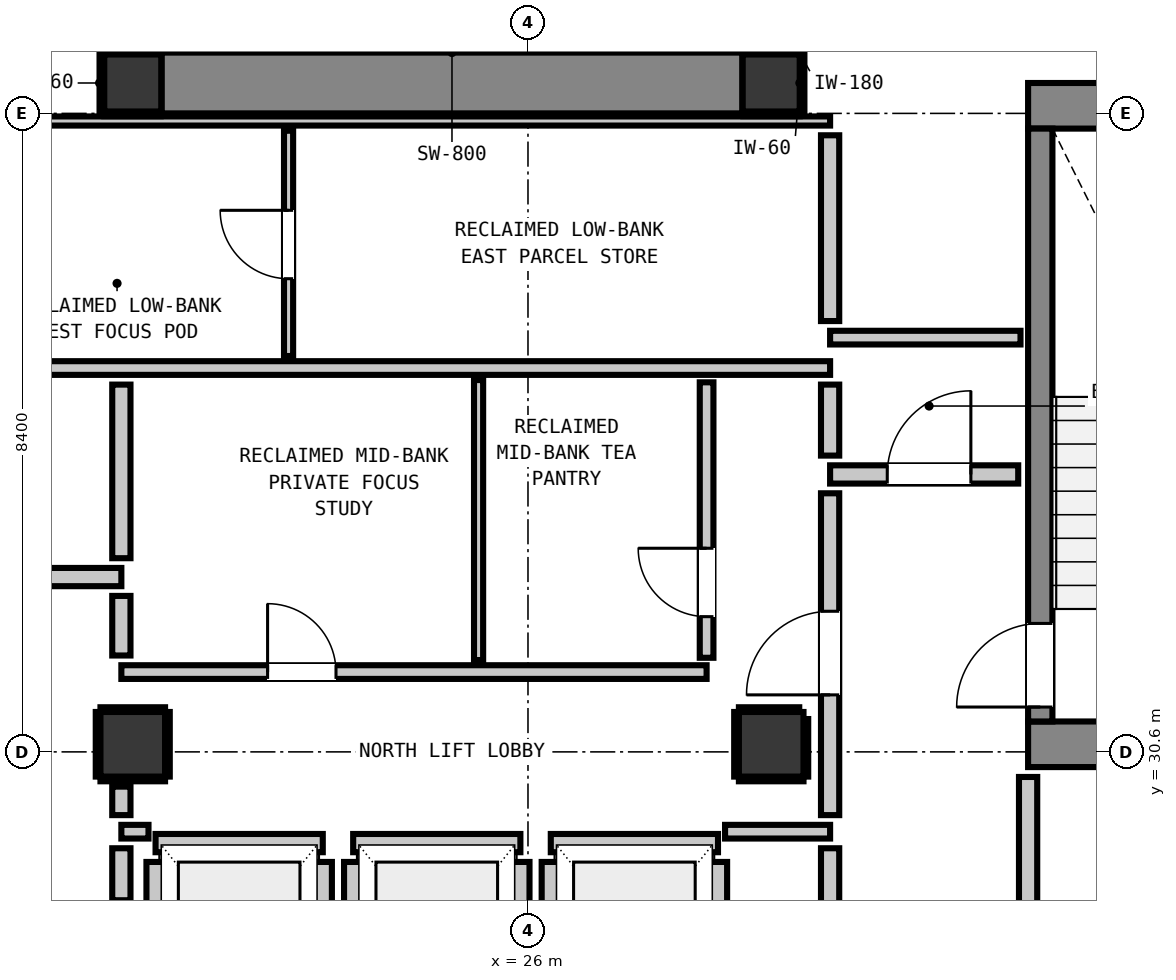
"""IFC4 building model, lengths in metres.
Left out: names, types, materials, properties, quantities, classifications, styles, units other than length and angle.
Written with IfcOpenShell. Run it as: python <this file> out.ifc"""

import sys

from ifc_helpers import new_model, si_unit, direction, frame, frame_2d, origin, origin_2d, place, context, subcontext, project, spatial, rectangle, extrude, element, fill, save


model = new_model("IFC4")
c1 = context("Model", 3, precision=1e-05, world=origin(), true_north=direction((0.0, 1.0)))
c2 = subcontext(c1, "Body", "Model", "MODEL_VIEW")
j1 = project(units=[si_unit("LENGTHUNIT", "METRE"), si_unit("PLANEANGLEUNIT", "RADIAN")], contexts=[c1])
p1 = place(None, origin())
s1 = spatial("IfcSite", under=j1, at=p1, CompositionType="ELEMENT")
p2 = place(p1, origin())
s2 = spatial("IfcBuilding", under=s1, at=p2, CompositionType="ELEMENT")
p3 = place(p2, frame((0.0, 0.0, 183.52)))
s3 = spatial("IfcBuildingStorey", under=s2, at=p3, CompositionType="ELEMENT", Elevation=183.52)
for number, where, z_axis, x_axis in (
    (1, (20.8, 39.4, 0.0), (0.0, 0.0, 1.0), (1.0, 0.0, 0.0)),
    (2, (29.2, 39.4, 0.0), (0.0, 0.0, 1.0), (1.0, 0.0, 0.0)),
):
    element("IfcColumn", number, at=place(p3, frame(where, z_axis=z_axis, x_axis=x_axis)), inside=s3, PredefinedType="COLUMN", context=c2, shape_type="SweptSolid", body=[
        extrude(rectangle(XDim=0.75, YDim=0.75, at=origin_2d()), origin(), (0.0, 0.0, 1.0), 3.32),
    ])
p4 = place(p3, frame((32.58, 39.1, 0.0), z_axis=(0.0, 0.0, 1.0), x_axis=(1.0, 0.0, 0.0)))
e3 = element("IfcWall", 3, at=p4, inside=s3, PredefinedType="SHEAR", context=c2, shape_type="SweptSolid", body=[
    extrude(rectangle(XDim=4.08, YDim=0.6, at=frame_2d((2.04, 0.0))), origin(), (0.0, 0.0, 1.0), 3.32),
])
p5 = place(p3, frame((32.58, 30.7, 0.0), z_axis=(0.0, 0.0, 1.0), x_axis=(1.0, 0.0, 0.0)))
e4 = element("IfcWall", 4, at=p5, inside=s3, PredefinedType="SHEAR", context=c2, shape_type="SweptSolid", body=[
    extrude(rectangle(XDim=3.54, YDim=0.6, at=frame_2d((1.77, 0.0))), origin(), (0.0, 0.0, 1.0), 3.32),
])
p6 = place(p3, frame((21.18, 39.4, 0.0), z_axis=(0.0, 0.0, 1.0), x_axis=(1.0, 0.0, 0.0)))
e5 = element("IfcWall", 5, at=p6, inside=s3, PredefinedType="SHEAR", context=c2, shape_type="SweptSolid", body=[
    extrude(rectangle(XDim=7.64, YDim=0.8, at=frame_2d((3.82, 0.0))), origin(), (0.0, 0.0, 1.0), 3.32),
])
p7 = place(p3, frame((32.74, 31.0, 0.0), z_axis=(0.0, 0.0, 1.0), x_axis=(0.0, 1.0, 0.0)))
e6 = element("IfcWall", 6, at=p7, inside=s3, PredefinedType="SHEAR", context=c2, shape_type="SweptSolid", body=[
    extrude(rectangle(XDim=7.8, YDim=0.32, at=frame_2d((3.9, 0.0))), origin(), (0.0, 0.0, 1.0), 3.32),
])
p8 = place(p7, frame((0.19, 0.0, 0.0)))
e7 = element("IfcOpeningElement", 7, at=p8, cuts=e6, PredefinedType="OPENING", context=c2, shape_type="SweptSolid", body=[
    extrude(rectangle(XDim=1.1, YDim=2.15, at=frame_2d((0.55, 1.075))), frame((0.0, 0.17, 0.0), z_axis=(0.0, -1.0, 0.0), x_axis=(1.0, 0.0, 0.0)), (0.0, 0.0, 1.0), 0.34),
])
for number, where, z_axis, x_axis in (
    (8, (20.8, 30.7, 0.0), (0.0, 0.0, 1.0), (1.0, 0.0, 0.0)),
    (9, (29.2, 30.7, 0.0), (0.0, 0.0, 1.0), (1.0, 0.0, 0.0)),
):
    element("IfcColumn", number, at=place(p3, frame(where, z_axis=z_axis, x_axis=x_axis)), inside=s3, PredefinedType="COLUMN", context=c2, shape_type="SweptSolid", body=[
        extrude(rectangle(XDim=0.85, YDim=0.85, at=origin_2d()), origin(), (0.0, 0.0, 1.0), 3.32),
    ])
p9 = place(p3, frame((21.1, 29.4, 0.0), z_axis=(0.0, 0.0, 1.0), x_axis=(1.0, 0.0, 0.0)))
e10 = element("IfcWall", 10, at=p9, inside=s3, PredefinedType="PARTITIONING", context=c2, shape_type="SweptSolid", body=[
    extrude(rectangle(XDim=2.2, YDim=0.24, at=frame_2d((1.1, 0.0))), origin(), (0.0, 0.0, 1.0), 3.08),
])
p10 = place(p3, frame((21.1, 27.048, 0.0), z_axis=(0.0, 0.0, 1.0), x_axis=(0.0, 1.0, 0.0)))
e11 = element("IfcWall", 11, at=p10, inside=s3, PredefinedType="PARTITIONING", context=c2, shape_type="SweptSolid", body=[
    extrude(rectangle(XDim=2.104, YDim=0.24, at=frame_2d((1.052, 0.0))), origin(), (0.0, 0.0, 1.0), 2.315),
])
p11 = place(p3, frame((23.3, 27.048, 0.0), z_axis=(0.0, 0.0, 1.0), x_axis=(0.0, 1.0, 0.0)))
e12 = element("IfcWall", 12, at=p11, inside=s3, PredefinedType="PARTITIONING", context=c2, shape_type="SweptSolid", body=[
    extrude(rectangle(XDim=2.104, YDim=0.24, at=frame_2d((1.052, 0.0))), origin(), (0.0, 0.0, 1.0), 3.08),
])
p12 = place(p3, frame((23.7, 29.4, 0.0), z_axis=(0.0, 0.0, 1.0), x_axis=(1.0, 0.0, 0.0)))
e13 = element("IfcWall", 13, at=p12, inside=s3, PredefinedType="PARTITIONING", context=c2, shape_type="SweptSolid", body=[
    extrude(rectangle(XDim=2.2, YDim=0.24, at=frame_2d((1.1, 0.0))), origin(), (0.0, 0.0, 1.0), 3.08),
])
for number, where, z_axis, x_axis in (
    (14, (23.7, 27.048, 0.0), (0.0, 0.0, 1.0), (0.0, 1.0, 0.0)),
    (15, (25.9, 27.048, 0.0), (0.0, 0.0, 1.0), (0.0, 1.0, 0.0)),
):
    element("IfcWall", number, at=place(p3, frame(where, z_axis=z_axis, x_axis=x_axis)), inside=s3, PredefinedType="PARTITIONING", context=c2, shape_type="SweptSolid", body=[
        extrude(rectangle(XDim=2.104, YDim=0.24, at=frame_2d((1.052, 0.0))), origin(), (0.0, 0.0, 1.0), 3.08),
    ])
p13 = place(p3, frame((26.3, 29.4, 0.0), z_axis=(0.0, 0.0, 1.0), x_axis=(1.0, 0.0, 0.0)))
e16 = element("IfcWall", 16, at=p13, inside=s3, PredefinedType="PARTITIONING", context=c2, shape_type="SweptSolid", body=[
    extrude(rectangle(XDim=2.2, YDim=0.24, at=frame_2d((1.1, 0.0))), origin(), (0.0, 0.0, 1.0), 3.08),
])
p14 = place(p3, frame((26.3, 27.048, 0.0), z_axis=(0.0, 0.0, 1.0), x_axis=(0.0, 1.0, 0.0)))
e17 = element("IfcWall", 17, at=p14, inside=s3, PredefinedType="PARTITIONING", context=c2, shape_type="SweptSolid", body=[
    extrude(rectangle(XDim=2.104, YDim=0.24, at=frame_2d((1.052, 0.0))), origin(), (0.0, 0.0, 1.0), 3.08),
])
p15 = place(p3, frame((28.5, 27.33, 0.0), z_axis=(0.0, 0.0, 1.0), x_axis=(0.0, 1.0, 0.0)))
e18 = element("IfcWall", 18, at=p15, inside=s3, PredefinedType="PARTITIONING", context=c2, shape_type="SweptSolid", body=[
    extrude(rectangle(XDim=1.822, YDim=0.24, at=frame_2d((0.911, 0.0))), origin(), (0.0, 0.0, 1.0), 3.08),
])
p16 = place(p3, frame((17.45, 32.9, 0.0), z_axis=(0.0, 0.0, 1.0), x_axis=(1.0, 0.0, 0.0)))
e19 = element("IfcWall", 19, at=p16, inside=s3, PredefinedType="PARTITIONING", context=c2, shape_type="SweptSolid", body=[
    extrude(rectangle(XDim=3.2, YDim=0.24, at=frame_2d((1.6, 0.0))), origin(), (0.0, 0.0, 1.0), 3.08),
])
p17 = place(p16, frame((0.159, 0.0, 0.0)))
e20 = element("IfcOpeningElement", 20, at=p17, cuts=e19, PredefinedType="OPENING", context=c2, shape_type="SweptSolid", body=[
    extrude(rectangle(XDim=1.1, YDim=2.15, at=frame_2d((0.55, 1.075))), frame((0.0, 0.13, 0.0), z_axis=(0.0, -1.0, 0.0), x_axis=(1.0, 0.0, 0.0)), (0.0, 0.0, 1.0), 0.26),
])
p18 = place(p3, frame((29.975, 34.25, 0.0), z_axis=(0.0, 0.0, 1.0), x_axis=(1.0, 0.0, 0.0)))
e21 = element("IfcWall", 21, at=p18, inside=s3, PredefinedType="PARTITIONING", context=c2, shape_type="SweptSolid", body=[
    extrude(rectangle(XDim=2.475, YDim=0.24, at=frame_2d((1.237, 0.0))), origin(), (0.0, 0.0, 1.0), 3.08),
])
p19 = place(p18, frame((0.752, 0.0, 0.0)))
e22 = element("IfcOpeningElement", 22, at=p19, cuts=e21, PredefinedType="OPENING", context=c2, shape_type="SweptSolid", body=[
    extrude(rectangle(XDim=1.1, YDim=2.15, at=frame_2d((0.55, 1.075))), frame((0.0, 0.13, 0.0), z_axis=(0.0, -1.0, 0.0), x_axis=(1.0, 0.0, 0.0)), (0.0, 0.0, 1.0), 0.26),
])
p20 = place(p3, frame((20.65, 29.55, 0.0), z_axis=(0.0, 0.0, 1.0), x_axis=(1.0, 0.0, 0.0)))
e23 = element("IfcWall", 23, at=p20, inside=s3, PredefinedType="PARTITIONING", context=c2, shape_type="SweptSolid", body=[
    extrude(rectangle(XDim=0.357, YDim=0.18, at=frame_2d((0.179, 0.0))), origin(), (0.0, 0.0, 1.0), 3.08),
])
p21 = place(p3, frame((28.593, 29.55, 0.0), z_axis=(0.0, 0.0, 1.0), x_axis=(1.0, 0.0, 0.0)))
e24 = element("IfcWall", 24, at=p21, inside=s3, PredefinedType="PARTITIONING", context=c2, shape_type="SweptSolid", body=[
    extrude(rectangle(XDim=1.382, YDim=0.18, at=frame_2d((0.691, 0.0))), origin(), (0.0, 0.0, 1.0), 3.08),
])
p22 = place(p3, frame((20.65, 31.65, 0.0), z_axis=(0.0, 0.0, 1.0), x_axis=(1.0, 0.0, 0.0)))
e25 = element("IfcWall", 25, at=p22, inside=s3, PredefinedType="PARTITIONING", context=c2, shape_type="SweptSolid", body=[
    extrude(rectangle(XDim=7.7, YDim=0.18, at=frame_2d((3.85, 0.0))), origin(), (0.0, 0.0, 1.0), 3.08),
])
p23 = place(p22, frame((1.924, 0.0, 0.0)))
e26 = element("IfcOpeningElement", 26, at=p23, cuts=e25, PredefinedType="OPENING", context=c2, shape_type="SweptSolid", body=[
    extrude(rectangle(XDim=0.9, YDim=2.1, at=frame_2d((0.45, 1.05))), frame((0.0, 0.1, 0.0), z_axis=(0.0, -1.0, 0.0), x_axis=(1.0, 0.0, 0.0)), (0.0, 0.0, 1.0), 0.2),
])
p24 = place(p3, frame((18.95, 35.65, 0.0), z_axis=(0.0, 0.0, 1.0), x_axis=(1.0, 0.0, 0.0)))
e27 = element("IfcWall", 27, at=p24, inside=s3, PredefinedType="PARTITIONING", context=c2, shape_type="SweptSolid", body=[
    extrude(rectangle(XDim=11.025, YDim=0.18, at=frame_2d((5.513, 0.0))), origin(), (0.0, 0.0, 1.0), 3.08),
])
p25 = place(p3, frame((29.975, 36.05, 0.0), z_axis=(0.0, 0.0, 1.0), x_axis=(1.0, 0.0, 0.0)))
e28 = element("IfcWall", 28, at=p25, inside=s3, PredefinedType="PARTITIONING", context=c2, shape_type="SweptSolid", body=[
    extrude(rectangle(XDim=2.505, YDim=0.18, at=frame_2d((1.252, 0.0))), origin(), (0.0, 0.0, 1.0), 3.08),
])
p26 = place(p3, frame((18.95, 38.9, 0.0), z_axis=(0.0, 0.0, 1.0), x_axis=(1.0, 0.0, 0.0)))
e29 = element("IfcWall", 29, at=p26, inside=s3, PredefinedType="PARTITIONING", context=c2, shape_type="SweptSolid", body=[
    extrude(rectangle(XDim=11.025, YDim=0.12, at=frame_2d((5.513, 0.0))), origin(), (0.0, 0.0, 1.0), 3.08),
])
p27 = place(p3, frame((20.65, 28.648, 0.0), z_axis=(0.0, 0.0, 1.0), x_axis=(0.0, 1.0, 0.0)))
e30 = element("IfcWall", 30, at=p27, inside=s3, PredefinedType="PARTITIONING", context=c2, shape_type="SweptSolid", body=[
    extrude(rectangle(XDim=0.684, YDim=0.24, at=frame_2d((0.342, 0.0))), origin(), (0.0, 0.0, 1.0), 2.315),
])
p28 = place(p3, frame((20.65, 29.768, 0.0), z_axis=(0.0, 0.0, 1.0), x_axis=(0.0, 1.0, 0.0)))
e31 = element("IfcWall", 31, at=p28, inside=s3, PredefinedType="PARTITIONING", context=c2, shape_type="SweptSolid", body=[
    extrude(rectangle(XDim=0.375, YDim=0.24, at=frame_2d((0.188, 0.0))), origin(), (0.0, 0.0, 1.0), 2.315),
])
p29 = place(p3, frame((20.65, 31.868, 0.0), z_axis=(0.0, 0.0, 1.0), x_axis=(0.0, 1.0, 0.0)))
e32 = element("IfcWall", 32, at=p29, inside=s3, PredefinedType="PARTITIONING", context=c2, shape_type="SweptSolid", body=[
    extrude(rectangle(XDim=0.784, YDim=0.24, at=frame_2d((0.392, 0.0))), origin(), (0.0, 0.0, 1.0), 2.315),
])
p30 = place(p3, frame((20.65, 33.148, 0.0), z_axis=(0.0, 0.0, 1.0), x_axis=(0.0, 1.0, 0.0)))
e33 = element("IfcWall", 33, at=p30, inside=s3, PredefinedType="PARTITIONING", context=c2, shape_type="SweptSolid", body=[
    extrude(rectangle(XDim=2.284, YDim=0.24, at=frame_2d((1.142, 0.0))), origin(), (0.0, 0.0, 1.0), 2.315),
])
p31 = place(p3, frame((29.975, 25.648, 0.0), z_axis=(0.0, 0.0, 1.0), x_axis=(0.0, 1.0, 0.0)))
e34 = element("IfcWall", 34, at=p31, inside=s3, PredefinedType="PARTITIONING", context=c2, shape_type="SweptSolid", body=[
    extrude(rectangle(XDim=3.684, YDim=0.24, at=frame_2d((1.842, 0.0))), origin(), (0.0, 0.0, 1.0), 3.08),
])
p32 = place(p3, frame((29.975, 29.768, 0.0), z_axis=(0.0, 0.0, 1.0), x_axis=(0.0, 1.0, 0.0)))
e35 = element("IfcWall", 35, at=p32, inside=s3, PredefinedType="PARTITIONING", context=c2, shape_type="SweptSolid", body=[
    extrude(rectangle(XDim=4.234, YDim=0.24, at=frame_2d((2.117, 0.0))), origin(), (0.0, 0.0, 1.0), 3.08),
])
p33 = place(p32, frame((1.582, 0.0, 0.0)))
e36 = element("IfcOpeningElement", 36, at=p33, cuts=e35, PredefinedType="OPENING", context=c2, shape_type="SweptSolid", body=[
    extrude(rectangle(XDim=1.1, YDim=2.15, at=frame_2d((0.55, 1.075))), frame((0.0, 0.13, 0.0), z_axis=(0.0, -1.0, 0.0), x_axis=(1.0, 0.0, 0.0)), (0.0, 0.0, 1.0), 0.26),
])
p34 = place(p3, frame((29.975, 34.498, 0.0), z_axis=(0.0, 0.0, 1.0), x_axis=(0.0, 1.0, 0.0)))
e37 = element("IfcWall", 37, at=p34, inside=s3, PredefinedType="PARTITIONING", context=c2, shape_type="SweptSolid", body=[
    extrude(rectangle(XDim=0.934, YDim=0.24, at=frame_2d((0.467, 0.0))), origin(), (0.0, 0.0, 1.0), 3.08),
])
p35 = place(p3, frame((29.975, 36.268, 0.0), z_axis=(0.0, 0.0, 1.0), x_axis=(0.0, 1.0, 0.0)))
e38 = element("IfcWall", 38, at=p35, inside=s3, PredefinedType="PARTITIONING", context=c2, shape_type="SweptSolid", body=[
    extrude(rectangle(XDim=2.444, YDim=0.24, at=frame_2d((1.222, 0.0))), origin(), (0.0, 0.0, 1.0), 3.08),
])
p36 = place(p3, frame((32.58, 25.648, 0.0), z_axis=(0.0, 0.0, 1.0), x_axis=(0.0, 1.0, 0.0)))
e39 = element("IfcWall", 39, at=p36, inside=s3, PredefinedType="PARTITIONING", context=c2, shape_type="SweptSolid", body=[
    extrude(rectangle(XDim=4.622, YDim=0.24, at=frame_2d((2.311, 0.0))), origin(), (0.0, 0.0, 1.0), 3.08),
])
p37 = place(p3, frame((28.35, 31.838, 0.0), z_axis=(0.0, 0.0, 1.0), x_axis=(0.0, 1.0, 0.0)))
e40 = element("IfcWall", 40, at=p37, inside=s3, PredefinedType="PARTITIONING", context=c2, shape_type="SweptSolid", body=[
    extrude(rectangle(XDim=3.624, YDim=0.18, at=frame_2d((1.812, 0.0))), origin(), (0.0, 0.0, 1.0), 3.08),
])
p38 = place(p37, frame((0.541, 0.0, 0.0)))
e41 = element("IfcOpeningElement", 41, at=p38, cuts=e40, PredefinedType="OPENING", context=c2, shape_type="SweptSolid", body=[
    extrude(rectangle(XDim=0.9, YDim=2.1, at=frame_2d((0.45, 1.05))), frame((0.0, 0.1, 0.0), z_axis=(0.0, -1.0, 0.0), x_axis=(1.0, 0.0, 0.0)), (0.0, 0.0, 1.0), 0.2),
])
p39 = place(p3, frame((22.85, 35.808, 0.0), z_axis=(0.0, 0.0, 1.0), x_axis=(0.0, 1.0, 0.0)))
e42 = element("IfcWall", 42, at=p39, inside=s3, PredefinedType="PARTITIONING", context=c2, shape_type="SweptSolid", body=[
    extrude(rectangle(XDim=2.964, YDim=0.12, at=frame_2d((1.482, 0.0))), origin(), (0.0, 0.0, 1.0), 3.08),
])
p40 = place(p39, frame((1.017, 0.0, 0.0)))
e43 = element("IfcOpeningElement", 43, at=p40, cuts=e42, PredefinedType="OPENING", context=c2, shape_type="SweptSolid", body=[
    extrude(rectangle(XDim=0.9, YDim=2.1, at=frame_2d((0.45, 1.05))), frame((0.0, 0.07, 0.0), z_axis=(0.0, -1.0, 0.0), x_axis=(1.0, 0.0, 0.0)), (0.0, 0.0, 1.0), 0.14),
])
p41 = place(p3, frame((25.35, 31.808, 0.0), z_axis=(0.0, 0.0, 1.0), x_axis=(0.0, 1.0, 0.0)))
e44 = element("IfcWall", 44, at=p41, inside=s3, PredefinedType="PARTITIONING", context=c2, shape_type="SweptSolid", body=[
    extrude(rectangle(XDim=3.684, YDim=0.12, at=frame_2d((1.842, 0.0))), origin(), (0.0, 0.0, 1.0), 3.08),
])
for number, where, z_axis, x_axis in (
    (45, (20.425, 38.993, 0.0), (0.0, 0.0, 1.0), (1.0, 0.0, 0.0)),
    (46, (20.425, 39.807, 0.0), (0.0, 0.0, 1.0), (1.0, 0.0, 0.0)),
):
    element("IfcWall", number, at=place(p3, frame(where, z_axis=z_axis, x_axis=x_axis)), inside=s3, PredefinedType="PARTITIONING", context=c2, shape_type="SweptSolid", body=[
        extrude(rectangle(XDim=0.742, YDim=0.06, at=frame_2d((0.371, 0.0))), origin(), (0.0, 0.0, 1.0), 1.45),
    ])
p42 = place(p3, frame((20.393, 39.025, 0.0), z_axis=(0.0, 0.0, 1.0), x_axis=(0.0, 1.0, 0.0)))
e47 = element("IfcWall", 47, at=p42, inside=s3, PredefinedType="PARTITIONING", context=c2, shape_type="SweptSolid", body=[
    extrude(rectangle(XDim=0.75, YDim=0.06, at=frame_2d((0.375, 0.0))), origin(), (0.0, 0.0, 1.0), 1.45),
])
for number, where, z_axis, x_axis in (
    (48, (28.833, 38.993, 0.0), (0.0, 0.0, 1.0), (1.0, 0.0, 0.0)),
    (49, (28.833, 39.807, 0.0), (0.0, 0.0, 1.0), (1.0, 0.0, 0.0)),
):
    element("IfcWall", number, at=place(p3, frame(where, z_axis=z_axis, x_axis=x_axis)), inside=s3, PredefinedType="PARTITIONING", context=c2, shape_type="SweptSolid", body=[
        extrude(rectangle(XDim=0.742, YDim=0.06, at=frame_2d((0.371, 0.0))), origin(), (0.0, 0.0, 1.0), 1.45),
    ])
p43 = place(p3, frame((29.607, 39.025, 0.0), z_axis=(0.0, 0.0, 1.0), x_axis=(0.0, 1.0, 0.0)))
e50 = element("IfcWall", 50, at=p43, inside=s3, PredefinedType="PARTITIONING", context=c2, shape_type="SweptSolid", body=[
    extrude(rectangle(XDim=0.75, YDim=0.06, at=frame_2d((0.375, 0.0))), origin(), (0.0, 0.0, 1.0), 1.45),
])
for number, where, z_axis, x_axis in (
    (51, (20.375, 30.243, 0.0), (0.0, 0.0, 1.0), (1.0, 0.0, 0.0)),
    (52, (20.375, 31.157, 0.0), (0.0, 0.0, 1.0), (1.0, 0.0, 0.0)),
    (53, (20.343, 30.275, 0.0), (0.0, 0.0, 1.0), (0.0, 1.0, 0.0)),
    (54, (21.257, 30.275, 0.0), (0.0, 0.0, 1.0), (0.0, 1.0, 0.0)),
    (55, (28.775, 30.243, 0.0), (0.0, 0.0, 1.0), (1.0, 0.0, 0.0)),
):
    element("IfcWall", number, at=place(p3, frame(where, z_axis=z_axis, x_axis=x_axis)), inside=s3, PredefinedType="PARTITIONING", context=c2, shape_type="SweptSolid", body=[
        extrude(rectangle(XDim=0.85, YDim=0.06, at=frame_2d((0.425, 0.0))), origin(), (0.0, 0.0, 1.0), 1.45),
    ])
p44 = place(p3, frame((28.775, 31.157, 0.0), z_axis=(0.0, 0.0, 1.0), x_axis=(1.0, 0.0, 0.0)))
e56 = element("IfcWall", 56, at=p44, inside=s3, PredefinedType="PARTITIONING", context=c2, shape_type="SweptSolid", body=[
    extrude(rectangle(XDim=0.794, YDim=0.06, at=frame_2d((0.397, 0.0))), origin(), (0.0, 0.0, 1.0), 1.45),
])
p45 = place(p3, frame((28.743, 30.275, 0.0), z_axis=(0.0, 0.0, 1.0), x_axis=(0.0, 1.0, 0.0)))
e57 = element("IfcWall", 57, at=p45, inside=s3, PredefinedType="PARTITIONING", context=c2, shape_type="SweptSolid", body=[
    extrude(rectangle(XDim=0.85, YDim=0.06, at=frame_2d((0.425, 0.0))), origin(), (0.0, 0.0, 1.0), 1.45),
])
p46 = place(p3, frame((29.657, 30.275, 0.0), z_axis=(0.0, 0.0, 1.0), x_axis=(0.0, 1.0, 0.0)))
e58 = element("IfcWall", 58, at=p46, inside=s3, PredefinedType="PARTITIONING", context=c2, shape_type="SweptSolid", body=[
    extrude(rectangle(XDim=0.757, YDim=0.06, at=frame_2d((0.378, 0.0))), origin(), (0.0, 0.0, 1.0), 1.45),
])
p47 = place(p8, origin())
e59 = element("IfcDoor", 59, at=p47, inside=s3, OperationType="SINGLE_SWING_LEFT", PredefinedType="DOOR", context=c2, shape_type="SweptSolid", body=[
    extrude(rectangle(XDim=1.1, YDim=2.15, at=frame_2d((0.55, 1.075))), frame((0.0, 0.025, 0.0), z_axis=(0.0, -1.0, 0.0), x_axis=(1.0, 0.0, 0.0)), (0.0, 0.0, 1.0), 0.05),
])
fill(e7, e59)
p48 = place(p33, origin())
e60 = element("IfcDoor", 60, at=p48, inside=s3, OperationType="SINGLE_SWING_LEFT", PredefinedType="DOOR", context=c2, shape_type="SweptSolid", body=[
    extrude(rectangle(XDim=1.1, YDim=2.15, at=frame_2d((0.55, 1.075))), frame((0.0, 0.025, 0.0), z_axis=(0.0, -1.0, 0.0), x_axis=(1.0, 0.0, 0.0)), (0.0, 0.0, 1.0), 0.05),
])
fill(e36, e60)
p49 = place(p19, origin())
e61 = element("IfcDoor", 61, at=p49, inside=s3, OperationType="SINGLE_SWING_RIGHT", PredefinedType="DOOR", context=c2, shape_type="SweptSolid", body=[
    extrude(rectangle(XDim=1.1, YDim=2.15, at=frame_2d((0.55, 1.075))), frame((0.0, 0.025, 0.0), z_axis=(0.0, -1.0, 0.0), x_axis=(1.0, 0.0, 0.0)), (0.0, 0.0, 1.0), 0.05),
])
fill(e22, e61)
p50 = place(p40, origin())
e62 = element("IfcDoor", 62, at=p50, inside=s3, OperationType="SINGLE_SWING_RIGHT", PredefinedType="DOOR", context=c2, shape_type="SweptSolid", body=[
    extrude(rectangle(XDim=0.9, YDim=2.1, at=frame_2d((0.45, 1.05))), frame((0.0, 0.025, 0.0), z_axis=(0.0, -1.0, 0.0), x_axis=(1.0, 0.0, 0.0)), (0.0, 0.0, 1.0), 0.05),
])
fill(e43, e62)
p51 = place(p23, origin())
e63 = element("IfcDoor", 63, at=p51, inside=s3, OperationType="SINGLE_SWING_LEFT", PredefinedType="DOOR", context=c2, shape_type="SweptSolid", body=[
    extrude(rectangle(XDim=0.9, YDim=2.1, at=frame_2d((0.45, 1.05))), frame((0.0, 0.025, 0.0), z_axis=(0.0, -1.0, 0.0), x_axis=(1.0, 0.0, 0.0)), (0.0, 0.0, 1.0), 0.05),
])
fill(e26, e63)
p52 = place(p38, origin())
e64 = element("IfcDoor", 64, at=p52, inside=s3, OperationType="SINGLE_SWING_RIGHT", PredefinedType="DOOR", context=c2, shape_type="SweptSolid", body=[
    extrude(rectangle(XDim=0.9, YDim=2.1, at=frame_2d((0.45, 1.05))), frame((0.0, 0.025, 0.0), z_axis=(0.0, -1.0, 0.0), x_axis=(1.0, 0.0, 0.0)), (0.0, 0.0, 1.0), 0.05),
])
fill(e41, e64)
save(model, sys.argv[1])
